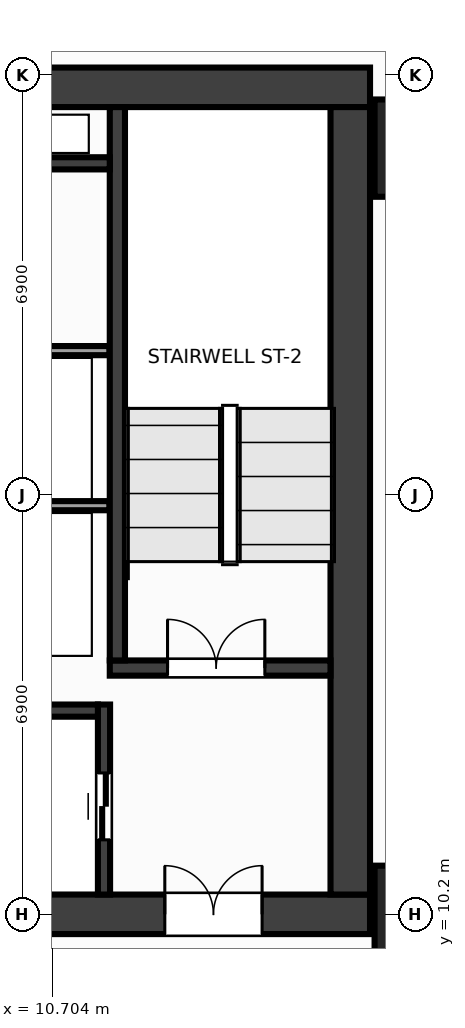
"""IFC4 building model, lengths in metres.
Left out: names, types, materials, properties, quantities, classifications, styles, units other than length and angle.
Written with IfcOpenShell. Run it as: python <this file> out.ifc"""

import sys

from ifc_helpers import new_model, si_unit, direction, frame, frame_2d, origin, origin_2d, place, context, subcontext, project, spatial, rectangle, extrude, source, transform, mapped, element, fill, save


model = new_model("IFC4")
c1 = context("Model", 3, precision=1e-05, world=origin(), true_north=direction((0.0, 1.0)))
c2 = subcontext(c1, "Body", "Model", "MODEL_VIEW")
j1 = project(units=[si_unit("LENGTHUNIT", "METRE"), si_unit("PLANEANGLEUNIT", "RADIAN")], contexts=[c1])
p1 = place(None, origin())
s1 = spatial("IfcSite", under=j1, at=p1, CompositionType="ELEMENT")
p2 = place(p1, origin())
s2 = spatial("IfcBuilding", under=s1, at=p2, CompositionType="ELEMENT")
p3 = place(p2, frame((0.0, 0.0, 92.0)))
s3 = spatial("IfcBuildingStorey", under=s2, at=p3, CompositionType="ELEMENT", Elevation=92.0)
m1 = source(origin(), c2, "Body", "SweptSolid", [
    extrude(rectangle(XDim=31.85, YDim=0.65, at=frame_2d((15.925, 0.0))), origin(), (0.0, 0.0, 1.0), 3.6),
])
p4 = place(p3, frame((-15.925, 23.8, 0.0), z_axis=(0.0, 0.0, 1.0), x_axis=(1.0, 0.0, 0.0)))
e1 = element("IfcWall", 1, at=p4, inside=s3, PredefinedType="SHEAR", context=c2, shape_type="MappedRepresentation", body=[
    mapped(m1, transform((0.0, 0.0, 0.0), x_axis=(1.0, 0.0, 0.0), y_axis=(0.0, 1.0, 0.0), z_axis=(0.0, 0.0, 1.0), scale=1.0)),
])
p5 = place(p3, frame((-15.925, 10.2, 0.0), z_axis=(0.0, 0.0, 1.0), x_axis=(1.0, 0.0, 0.0)))
e2 = element("IfcWall", 2, at=p5, inside=s3, PredefinedType="SHEAR", context=c2, shape_type="MappedRepresentation", body=[
    mapped(m1, transform((0.0, 0.0, 0.0), x_axis=(1.0, 0.0, 0.0), y_axis=(0.0, 1.0, 0.0), z_axis=(0.0, 0.0, 1.0), scale=1.0)),
])
p6 = place(p5, frame((1.775, 0.0, 0.0)))
e3 = element("IfcOpeningElement", 3, at=p6, cuts=e2, PredefinedType="OPENING", context=c2, shape_type="SweptSolid", body=[
    extrude(rectangle(XDim=1.6, YDim=2.15, at=frame_2d((0.8, 1.075))), frame((0.0, 0.337, 0.0), z_axis=(0.0, -1.0, 0.0), x_axis=(1.0, 0.0, 0.0)), (0.0, 0.0, 1.0), 0.674),
])
p7 = place(p5, frame((28.475, 0.0, 0.0)))
e4 = element("IfcOpeningElement", 4, at=p7, cuts=e2, PredefinedType="OPENING", context=c2, shape_type="SweptSolid", body=[
    extrude(rectangle(XDim=1.6, YDim=2.15, at=frame_2d((0.8, 1.075))), frame((0.0, 0.337, 0.0), z_axis=(0.0, -1.0, 0.0), x_axis=(1.0, 0.0, 0.0)), (0.0, 0.0, 1.0), 0.674),
])
p8 = place(p5, frame((15.175, 0.0, 0.0)))
e5 = element("IfcOpeningElement", 5, at=p8, cuts=e2, PredefinedType="OPENING", context=c2, shape_type="SweptSolid", body=[
    extrude(rectangle(XDim=1.5, YDim=2.2, at=frame_2d((0.75, 1.1))), frame((0.0, 0.337, 0.0), z_axis=(0.0, -1.0, 0.0), x_axis=(1.0, 0.0, 0.0)), (0.0, 0.0, 1.0), 0.674),
])
m2 = source(origin(), c2, "Body", "SweptSolid", [
    extrude(rectangle(XDim=12.95, YDim=0.65, at=frame_2d((6.475, 0.0))), origin(), (0.0, 0.0, 1.0), 3.6),
])
p9 = place(p3, frame((15.6, 10.525, 0.0), z_axis=(0.0, 0.0, 1.0), x_axis=(0.0, 1.0, 0.0)))
e6 = element("IfcWall", 6, at=p9, inside=s3, PredefinedType="SHEAR", context=c2, shape_type="MappedRepresentation", body=[
    mapped(m2, transform((0.0, 0.0, 0.0), x_axis=(1.0, 0.0, 0.0), y_axis=(0.0, 1.0, 0.0), z_axis=(0.0, 0.0, 1.0), scale=1.0)),
])
m3 = source(origin(), c2, "Body", "SweptSolid", [
    extrude(rectangle(XDim=3.63, YDim=0.25, at=frame_2d((1.815, 0.0))), origin(), (0.0, 0.0, 1.0), 3.6),
])
p10 = place(p3, frame((11.645, 14.25, 0.0), z_axis=(0.0, 0.0, 1.0), x_axis=(1.0, 0.0, 0.0)))
e7 = element("IfcWall", 7, at=p10, inside=s3, PredefinedType="SHEAR", context=c2, shape_type="MappedRepresentation", body=[
    mapped(m3, transform((0.0, 0.0, 0.0), x_axis=(1.0, 0.0, 0.0), y_axis=(0.0, 1.0, 0.0), z_axis=(0.0, 0.0, 1.0), scale=1.0)),
])
p11 = place(p10, frame((0.95, 0.0, 0.0)))
e8 = element("IfcOpeningElement", 8, at=p11, cuts=e7, PredefinedType="OPENING", context=c2, shape_type="SweptSolid", body=[
    extrude(rectangle(XDim=1.6, YDim=2.15, at=frame_2d((0.8, 1.075))), frame((0.0, 0.137, 0.0), z_axis=(0.0, -1.0, 0.0), x_axis=(1.0, 0.0, 0.0)), (0.0, 0.0, 1.0), 0.274),
])
m4 = source(origin(), c2, "Body", "SweptSolid", [
    extrude(rectangle(XDim=9.1, YDim=0.25, at=frame_2d((4.55, 0.0))), origin(), (0.0, 0.0, 1.0), 3.6),
])
p12 = place(p3, frame((11.77, 14.375, 0.0), z_axis=(0.0, 0.0, 1.0), x_axis=(0.0, 1.0, 0.0)))
e9 = element("IfcWall", 9, at=p12, inside=s3, PredefinedType="SHEAR", context=c2, shape_type="MappedRepresentation", body=[
    mapped(m4, transform((0.0, 0.0, 0.0), x_axis=(1.0, 0.0, 0.0), y_axis=(0.0, 1.0, 0.0), z_axis=(0.0, 0.0, 1.0), scale=1.0)),
])
m5 = source(origin(), c2, "Body", "SweptSolid", [
    extrude(rectangle(XDim=3.125, YDim=0.2, at=frame_2d((1.562, 0.0))), origin(), (0.0, 0.0, 1.0), 3.6),
])
p13 = place(p3, frame((11.55, 10.525, 0.0), z_axis=(0.0, 0.0, 1.0), x_axis=(0.0, 1.0, 0.0)))
e10 = element("IfcWall", 10, at=p13, inside=s3, PredefinedType="SHEAR", context=c2, shape_type="MappedRepresentation", body=[
    mapped(m5, transform((0.0, 0.0, 0.0), x_axis=(1.0, 0.0, 0.0), y_axis=(0.0, 1.0, 0.0), z_axis=(0.0, 0.0, 1.0), scale=1.0)),
])
p14 = place(p13, frame((0.9, 0.0, 0.0)))
e11 = element("IfcOpeningElement", 11, at=p14, cuts=e10, PredefinedType="OPENING", context=c2, shape_type="SweptSolid", body=[
    extrude(rectangle(XDim=1.1, YDim=2.15, at=frame_2d((0.55, 1.075))), frame((0.0, 0.112, 0.0), z_axis=(0.0, -1.0, 0.0), x_axis=(1.0, 0.0, 0.0)), (0.0, 0.0, 1.0), 0.224),
])
m6 = source(origin(), c2, "Body", "SweptSolid", [
    extrude(rectangle(XDim=2.825, YDim=0.2, at=frame_2d((1.413, 0.0))), origin(), (0.0, 0.0, 1.0), 3.6),
])
p15 = place(p3, frame((8.625, 13.55, 0.0), z_axis=(0.0, 0.0, 1.0), x_axis=(1.0, 0.0, 0.0)))
e12 = element("IfcWall", 12, at=p15, inside=s3, PredefinedType="SHEAR", context=c2, shape_type="MappedRepresentation", body=[
    mapped(m6, transform((0.0, 0.0, 0.0), x_axis=(1.0, 0.0, 0.0), y_axis=(0.0, 1.0, 0.0), z_axis=(0.0, 0.0, 1.0), scale=1.0)),
])
m7 = source(origin(), c2, "Body", "SweptSolid", [
    extrude(rectangle(XDim=3.02, YDim=0.2, at=frame_2d((1.51, 0.0))), origin(), (0.0, 0.0, 1.0), 3.6),
])
p16 = place(p3, frame((8.625, 22.55, 0.0), z_axis=(0.0, 0.0, 1.0), x_axis=(1.0, 0.0, 0.0)))
e13 = element("IfcWall", 13, at=p16, inside=s3, PredefinedType="SHEAR", context=c2, shape_type="MappedRepresentation", body=[
    mapped(m7, transform((0.0, 0.0, 0.0), x_axis=(1.0, 0.0, 0.0), y_axis=(0.0, 1.0, 0.0), z_axis=(0.0, 0.0, 1.0), scale=1.0)),
])
m8 = source(origin(), c2, "Body", "SweptSolid", [
    extrude(rectangle(XDim=1.6, YDim=1.6, at=origin_2d()), origin(), (0.0, 0.0, 1.0), 3.6),
])
for number, where, z_axis, x_axis in (
    (14, (16.8, 10.2, 0.0), (0.0, 0.0, 1.0), (1.0, 0.0, 0.0)),
    (15, (16.8, 22.8, 0.0), (0.0, 0.0, 1.0), (1.0, 0.0, 0.0)),
):
    element("IfcColumn", number, at=place(p3, frame(where, z_axis=z_axis, x_axis=x_axis)), inside=s3, PredefinedType="COLUMN", context=c2, shape_type="MappedRepresentation", body=[
        mapped(m8, transform((0.0, 0.0, 0.0), x_axis=(1.0, 0.0, 0.0), y_axis=(0.0, 1.0, 0.0), z_axis=(0.0, 0.0, 1.0), scale=1.0)),
    ])
m9 = source(origin(), c2, "Body", "SweptSolid", [
    extrude(rectangle(XDim=3.01, YDim=0.15, at=frame_2d((1.505, 0.0))), origin(), (0.0, 0.0, 1.0), 3.36),
])
for number, where, z_axis, x_axis in (
    (16, (8.63, 16.92, 0.0), (0.0, 0.0, 1.0), (1.0, 0.0, 0.0)),
    (17, (8.63, 19.47, 0.0), (0.0, 0.0, 1.0), (1.0, 0.0, 0.0)),
):
    element("IfcWall", number, at=place(p3, frame(where, z_axis=z_axis, x_axis=x_axis)), inside=s3, PredefinedType="PARTITIONING", context=c2, shape_type="MappedRepresentation", body=[
        mapped(m9, transform((0.0, 0.0, 0.0), x_axis=(1.0, 0.0, 0.0), y_axis=(0.0, 1.0, 0.0), z_axis=(0.0, 0.0, 1.0), scale=1.0)),
    ])
m10 = source(origin(), c2, "Body", "SweptSolid", [
    extrude(rectangle(XDim=1.6, YDim=2.15, at=frame_2d((0.8, 1.075))), frame((0.0, 0.025, 0.0), z_axis=(0.0, -1.0, 0.0), x_axis=(1.0, 0.0, 0.0)), (0.0, 0.0, 1.0), 0.05),
])
p17 = place(p11, origin())
e18 = element("IfcDoor", 18, at=p17, inside=s3, OperationType="DOUBLE_DOOR_SINGLE_SWING", PredefinedType="DOOR", context=c2, shape_type="MappedRepresentation", body=[
    mapped(m10, transform((0.0, 0.0, 0.0), x_axis=(1.0, 0.0, 0.0), y_axis=(0.0, 1.0, 0.0), z_axis=(0.0, 0.0, 1.0), scale=1.0)),
])
fill(e8, e18)
p18 = place(p7, origin())
e19 = element("IfcDoor", 19, at=p18, inside=s3, OperationType="DOUBLE_DOOR_SINGLE_SWING", PredefinedType="DOOR", context=c2, shape_type="MappedRepresentation", body=[
    mapped(m10, transform((0.0, 0.0, 0.0), x_axis=(1.0, 0.0, 0.0), y_axis=(0.0, 1.0, 0.0), z_axis=(0.0, 0.0, 1.0), scale=1.0)),
])
fill(e4, e19)
m11 = source(origin(), c2, "Body", "SweptSolid", [
    extrude(rectangle(XDim=1.1, YDim=2.15, at=frame_2d((0.55, 1.075))), frame((0.0, 0.025, 0.0), z_axis=(0.0, -1.0, 0.0), x_axis=(1.0, 0.0, 0.0)), (0.0, 0.0, 1.0), 0.05),
])
p19 = place(p14, origin())
e20 = element("IfcDoor", 20, at=p19, inside=s3, OperationType="DOUBLE_DOOR_SLIDING", PredefinedType="DOOR", context=c2, shape_type="MappedRepresentation", body=[
    mapped(m11, transform((0.0, 0.0, 0.0), x_axis=(1.0, 0.0, 0.0), y_axis=(0.0, 1.0, 0.0), z_axis=(0.0, 0.0, 1.0), scale=1.0)),
])
fill(e11, e20)
save(model, sys.argv[1])
